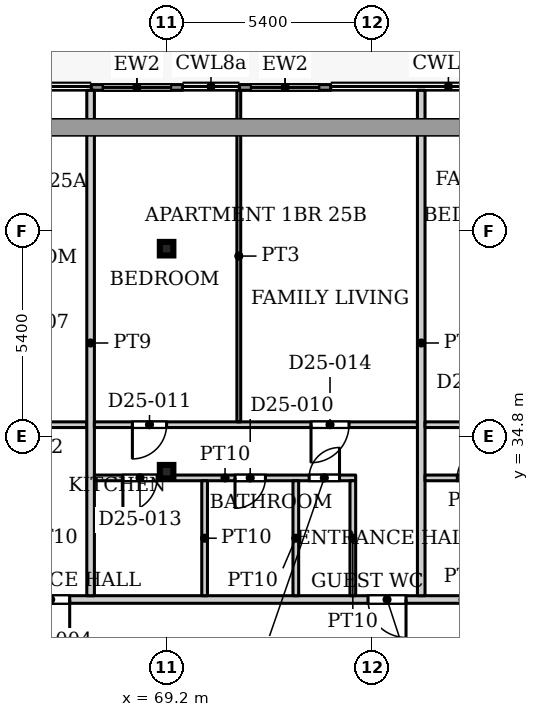
"""IFC4 building model, lengths in metres.
Left out: names, types, materials, properties, quantities, classifications, styles, units other than length and angle.
Written with IfcOpenShell. Run it as: python <this file> out.ifc"""

import sys

from ifc_helpers import new_model, si_unit, direction, frame, frame_2d, origin, origin_2d, place, context, subcontext, project, spatial, rectangle, hollow_rectangle, extrude, source, transform, mapped, element, fill, save


model = new_model("IFC4")
c1 = context("Model", 3, precision=1e-05, world=origin(), true_north=direction((0.0, 1.0)))
c2 = subcontext(c1, "Body", "Model", "MODEL_VIEW")
j1 = project(units=[si_unit("LENGTHUNIT", "METRE"), si_unit("PLANEANGLEUNIT", "RADIAN")], contexts=[c1])
p1 = place(None, origin())
s1 = spatial("IfcSite", under=j1, at=p1, CompositionType="ELEMENT")
p2 = place(p1, origin())
s2 = spatial("IfcBuilding", under=s1, at=p2, CompositionType="ELEMENT")
p3 = place(p2, frame((0.0, 0.0, 109.7)))
s3 = spatial("IfcBuildingStorey", under=s2, at=p3, CompositionType="ELEMENT", Elevation=109.7)
for number, where, z_axis, x_axis in (
    (1, (69.2, 33.863, 0.0), (0.0, 0.0, 1.0), (1.0, 0.0, 0.0)),
    (2, (69.2, 39.732, 0.0), (0.0, 0.0, 1.0), (1.0, 0.0, 0.0)),
):
    element("IfcColumn", number, at=place(p3, frame(where, z_axis=z_axis, x_axis=x_axis)), inside=s3, PredefinedType="COLUMN", context=c2, shape_type="SweptSolid", body=[
        extrude(hollow_rectangle(XDim=0.356, YDim=0.356, WallThickness=0.016, InnerFilletRadius=0.016, OuterFilletRadius=0.032, at=origin_2d()), origin(), (0.0, 0.0, 1.0), 3.9),
    ])
p4 = place(p3, frame((67.218, 43.975, 0.0), z_axis=(0.0, 0.0, 1.0), x_axis=(1.0, 0.0, 0.0)))
e3 = element("IfcWall", 3, at=p4, inside=s3, PredefinedType="SOLIDWALL", context=c2, shape_type="SweptSolid", body=[
    extrude(rectangle(XDim=2.4, YDim=0.15, at=frame_2d((1.2, 0.0))), origin(), (0.0, 0.0, 1.0), 3.75),
])
p5 = place(p4, frame((0.3, 0.0, 0.0)))
e4 = element("IfcOpeningElement", 4, at=p5, cuts=e3, PredefinedType="OPENING", context=c2, shape_type="SweptSolid", body=[
    extrude(rectangle(XDim=1.8, YDim=2.4, at=frame_2d((0.9, 1.2))), frame((0.0, 0.085, 0.0), z_axis=(0.0, -1.0, 0.0), x_axis=(1.0, 0.0, 0.0)), (0.0, 0.0, 1.0), 0.17),
])
p6 = place(p3, frame((71.118, 43.975, 0.0), z_axis=(0.0, 0.0, 1.0), x_axis=(1.0, 0.0, 0.0)))
e5 = element("IfcWall", 5, at=p6, inside=s3, PredefinedType="SOLIDWALL", context=c2, shape_type="SweptSolid", body=[
    extrude(rectangle(XDim=2.4, YDim=0.15, at=frame_2d((1.2, 0.0))), origin(), (0.0, 0.0, 1.0), 3.75),
])
p7 = place(p6, frame((0.3, 0.0, 0.0)))
e6 = element("IfcOpeningElement", 6, at=p7, cuts=e5, PredefinedType="OPENING", context=c2, shape_type="SweptSolid", body=[
    extrude(rectangle(XDim=1.8, YDim=2.4, at=frame_2d((0.9, 1.2))), frame((0.0, 0.085, 0.0), z_axis=(0.0, -1.0, 0.0), x_axis=(1.0, 0.0, 0.0)), (0.0, 0.0, 1.0), 0.17),
])
p8 = place(p3, frame((55.9, 30.5, 0.0), z_axis=(0.0, 0.0, 1.0), x_axis=(1.0, 0.0, 0.0)))
e7 = element("IfcWall", 7, at=p8, inside=s3, PredefinedType="PARTITIONING", context=c2, shape_type="SweptSolid", body=[
    extrude(rectangle(XDim=42.2, YDim=0.2, at=frame_2d((21.1, 0.0))), origin(), (0.0, 0.0, 1.0), 3.6),
])
p9 = place(p8, frame((9.75, 0.0, 0.0)))
e8 = element("IfcOpeningElement", 8, at=p9, cuts=e7, PredefinedType="OPENING", context=c2, shape_type="SweptSolid", body=[
    extrude(rectangle(XDim=1.0, YDim=2.1, at=frame_2d((0.5, 1.05))), frame((0.0, 0.11, 0.0), z_axis=(0.0, -1.0, 0.0), x_axis=(1.0, 0.0, 0.0)), (0.0, 0.0, 1.0), 0.22),
])
p10 = place(p8, frame((18.6, 0.0, 0.0)))
e9 = element("IfcOpeningElement", 9, at=p10, cuts=e7, PredefinedType="OPENING", context=c2, shape_type="SweptSolid", body=[
    extrude(rectangle(XDim=1.0, YDim=2.1, at=frame_2d((0.5, 1.05))), frame((0.0, 0.11, 0.0), z_axis=(0.0, -1.0, 0.0), x_axis=(1.0, 0.0, 0.0)), (0.0, 0.0, 1.0), 0.22),
])
p11 = place(p8, frame((23.4, 0.0, 0.0)))
e10 = element("IfcOpeningElement", 10, at=p11, cuts=e7, PredefinedType="OPENING", context=c2, shape_type="SweptSolid", body=[
    extrude(rectangle(XDim=1.0, YDim=2.1, at=frame_2d((0.5, 1.05))), frame((0.0, 0.11, 0.0), z_axis=(0.0, -1.0, 0.0), x_axis=(1.0, 0.0, 0.0)), (0.0, 0.0, 1.0), 0.22),
])
p12 = place(p8, frame((40.2, 0.0, 0.0)))
e11 = element("IfcOpeningElement", 11, at=p12, cuts=e7, PredefinedType="OPENING", context=c2, shape_type="SweptSolid", body=[
    extrude(rectangle(XDim=1.0, YDim=2.1, at=frame_2d((0.5, 1.05))), frame((0.0, 0.11, 0.0), z_axis=(0.0, -1.0, 0.0), x_axis=(1.0, 0.0, 0.0)), (0.0, 0.0, 1.0), 0.22),
])
p13 = place(p3, frame((55.9, 35.1, 0.0), z_axis=(0.0, 0.0, 1.0), x_axis=(1.0, 0.0, 0.0)))
e12 = element("IfcWall", 12, at=p13, inside=s3, PredefinedType="PARTITIONING", context=c2, shape_type="SweptSolid", body=[
    extrude(rectangle(XDim=11.2, YDim=0.15, at=frame_2d((5.6, 0.0))), origin(), (0.0, 0.0, 1.0), 3.6),
])
p14 = place(p13, frame((9.05, 0.0, 0.0)))
e13 = element("IfcOpeningElement", 13, at=p14, cuts=e12, PredefinedType="OPENING", context=c2, shape_type="SweptSolid", body=[
    extrude(rectangle(XDim=0.9, YDim=2.1, at=frame_2d((0.45, 1.05))), frame((0.0, 0.085, 0.0), z_axis=(0.0, -1.0, 0.0), x_axis=(1.0, 0.0, 0.0)), (0.0, 0.0, 1.0), 0.17),
])
p15 = place(p13, frame((1.5, 0.0, 0.0)))
e14 = element("IfcOpeningElement", 14, at=p15, cuts=e12, PredefinedType="OPENING", context=c2, shape_type="SweptSolid", body=[
    extrude(rectangle(XDim=1.0, YDim=2.1, at=frame_2d((0.5, 1.05))), frame((0.0, 0.085, 0.0), z_axis=(0.0, -1.0, 0.0), x_axis=(1.0, 0.0, 0.0)), (0.0, 0.0, 1.0), 0.17),
])
p16 = place(p13, frame((6.5, 0.0, 0.0)))
e15 = element("IfcOpeningElement", 15, at=p16, cuts=e12, PredefinedType="OPENING", context=c2, shape_type="SweptSolid", body=[
    extrude(rectangle(XDim=0.9, YDim=2.1, at=frame_2d((0.45, 1.05))), frame((0.0, 0.085, 0.0), z_axis=(0.0, -1.0, 0.0), x_axis=(1.0, 0.0, 0.0)), (0.0, 0.0, 1.0), 0.17),
])
p17 = place(p3, frame((67.2, 30.6, 0.0), z_axis=(0.0, 0.0, 1.0), x_axis=(0.0, 1.0, 0.0)))
e16 = element("IfcWall", 16, at=p17, inside=s3, PredefinedType="PARTITIONING", context=c2, shape_type="SweptSolid", body=[
    extrude(rectangle(XDim=13.3, YDim=0.2, at=frame_2d((6.65, 0.0))), origin(), (0.0, 0.0, 1.0), 3.6),
])
p18 = place(p3, frame((67.3, 33.7, 0.0), z_axis=(0.0, 0.0, 1.0), x_axis=(1.0, 0.0, 0.0)))
e17 = element("IfcWall", 17, at=p18, inside=s3, PredefinedType="PARTITIONING", context=c2, shape_type="SweptSolid", body=[
    extrude(rectangle(XDim=6.875, YDim=0.15, at=frame_2d((3.438, 0.0))), origin(), (0.0, 0.0, 1.0), 3.6),
])
p19 = place(p18, frame((3.7, 0.0, 0.0)))
e18 = element("IfcOpeningElement", 18, at=p19, cuts=e17, PredefinedType="OPENING", context=c2, shape_type="SweptSolid", body=[
    extrude(rectangle(XDim=0.8, YDim=2.1, at=frame_2d((0.4, 1.05))), frame((0.0, 0.085, 0.0), z_axis=(0.0, -1.0, 0.0), x_axis=(1.0, 0.0, 0.0)), (0.0, 0.0, 1.0), 0.17),
])
p20 = place(p18, frame((0.75, 0.0, 0.0)))
e19 = element("IfcOpeningElement", 19, at=p20, cuts=e17, PredefinedType="OPENING", context=c2, shape_type="SweptSolid", body=[
    extrude(rectangle(XDim=0.9, YDim=2.1, at=frame_2d((0.45, 1.05))), frame((0.0, 0.085, 0.0), z_axis=(0.0, -1.0, 0.0), x_axis=(1.0, 0.0, 0.0)), (0.0, 0.0, 1.0), 0.17),
])
p21 = place(p18, frame((5.65, 0.0, 0.0)))
e20 = element("IfcOpeningElement", 20, at=p21, cuts=e17, PredefinedType="OPENING", context=c2, shape_type="SweptSolid", body=[
    extrude(rectangle(XDim=0.8, YDim=2.1, at=frame_2d((0.4, 1.05))), frame((0.0, 0.085, 0.0), z_axis=(0.0, -1.0, 0.0), x_axis=(1.0, 0.0, 0.0)), (0.0, 0.0, 1.0), 0.17),
])
p22 = place(p3, frame((67.3, 35.1, 0.0), z_axis=(0.0, 0.0, 1.0), x_axis=(1.0, 0.0, 0.0)))
e21 = element("IfcWall", 21, at=p22, inside=s3, PredefinedType="PARTITIONING", context=c2, shape_type="SweptSolid", body=[
    extrude(rectangle(XDim=8.5, YDim=0.15, at=frame_2d((4.25, 0.0))), origin(), (0.0, 0.0, 1.0), 3.6),
])
p23 = place(p22, frame((1.0, 0.0, 0.0)))
e22 = element("IfcOpeningElement", 22, at=p23, cuts=e21, PredefinedType="OPENING", context=c2, shape_type="SweptSolid", body=[
    extrude(rectangle(XDim=0.9, YDim=2.1, at=frame_2d((0.45, 1.05))), frame((0.0, 0.085, 0.0), z_axis=(0.0, -1.0, 0.0), x_axis=(1.0, 0.0, 0.0)), (0.0, 0.0, 1.0), 0.17),
])
p24 = place(p22, frame((5.7, 0.0, 0.0)))
e23 = element("IfcOpeningElement", 23, at=p24, cuts=e21, PredefinedType="OPENING", context=c2, shape_type="SweptSolid", body=[
    extrude(rectangle(XDim=1.0, YDim=2.1, at=frame_2d((0.5, 1.05))), frame((0.0, 0.085, 0.0), z_axis=(0.0, -1.0, 0.0), x_axis=(1.0, 0.0, 0.0)), (0.0, 0.0, 1.0), 0.17),
])
p25 = place(p3, frame((70.2, 30.6, 0.0), z_axis=(0.0, 0.0, 1.0), x_axis=(0.0, 1.0, 0.0)))
e24 = element("IfcWall", 24, at=p25, inside=s3, PredefinedType="PARTITIONING", context=c2, shape_type="SweptSolid", body=[
    extrude(rectangle(XDim=3.025, YDim=0.15, at=frame_2d((1.512, 0.0))), origin(), (0.0, 0.0, 1.0), 3.6),
])
p26 = place(p3, frame((71.1, 35.175, 0.0), z_axis=(0.0, 0.0, 1.0), x_axis=(0.0, 1.0, 0.0)))
e25 = element("IfcWall", 25, at=p26, inside=s3, PredefinedType="PARTITIONING", context=c2, shape_type="SweptSolid", body=[
    extrude(rectangle(XDim=8.725, YDim=0.1, at=frame_2d((4.362, 0.0))), origin(), (0.0, 0.0, 1.0), 3.6),
])
for number, where, z_axis, x_axis in (
    (26, (72.6, 30.6, 0.0), (0.0, 0.0, 1.0), (0.0, 1.0, 0.0)),
    (27, (74.1, 30.6, 0.0), (0.0, 0.0, 1.0), (0.0, 1.0, 0.0)),
):
    element("IfcWall", number, at=place(p3, frame(where, z_axis=z_axis, x_axis=x_axis)), inside=s3, PredefinedType="PARTITIONING", context=c2, shape_type="SweptSolid", body=[
        extrude(rectangle(XDim=3.025, YDim=0.15, at=frame_2d((1.512, 0.0))), origin(), (0.0, 0.0, 1.0), 3.6),
    ])
p27 = place(p3, frame((75.9, 30.6, 0.0), z_axis=(0.0, 0.0, 1.0), x_axis=(0.0, 1.0, 0.0)))
e28 = element("IfcWall", 28, at=p27, inside=s3, PredefinedType="PARTITIONING", context=c2, shape_type="SweptSolid", body=[
    extrude(rectangle(XDim=13.3, YDim=0.2, at=frame_2d((6.65, 0.0))), origin(), (0.0, 0.0, 1.0), 3.6),
])
p28 = place(p3, frame((76.0, 33.7, 0.0), z_axis=(0.0, 0.0, 1.0), x_axis=(1.0, 0.0, 0.0)))
e29 = element("IfcWall", 29, at=p28, inside=s3, PredefinedType="PARTITIONING", context=c2, shape_type="SweptSolid", body=[
    extrude(rectangle(XDim=2.525, YDim=0.15, at=frame_2d((1.262, 0.0))), origin(), (0.0, 0.0, 1.0), 3.6),
])
p29 = place(p28, frame((0.85, 0.0, 0.0)))
e30 = element("IfcOpeningElement", 30, at=p29, cuts=e29, PredefinedType="OPENING", context=c2, shape_type="SweptSolid", body=[
    extrude(rectangle(XDim=0.8, YDim=2.1, at=frame_2d((0.4, 1.05))), frame((0.0, 0.085, 0.0), z_axis=(0.0, -1.0, 0.0), x_axis=(1.0, 0.0, 0.0)), (0.0, 0.0, 1.0), 0.17),
])
p30 = place(p3, frame((76.0, 35.1, 0.0), z_axis=(0.0, 0.0, 1.0), x_axis=(1.0, 0.0, 0.0)))
e31 = element("IfcWall", 31, at=p30, inside=s3, PredefinedType="PARTITIONING", context=c2, shape_type="SweptSolid", body=[
    extrude(rectangle(XDim=14.5, YDim=0.15, at=frame_2d((7.25, 0.0))), origin(), (0.0, 0.0, 1.0), 3.6),
])
p31 = place(p30, frame((0.95, 0.0, 0.0)))
e32 = element("IfcOpeningElement", 32, at=p31, cuts=e31, PredefinedType="OPENING", context=c2, shape_type="SweptSolid", body=[
    extrude(rectangle(XDim=0.9, YDim=2.1, at=frame_2d((0.45, 1.05))), frame((0.0, 0.085, 0.0), z_axis=(0.0, -1.0, 0.0), x_axis=(1.0, 0.0, 0.0)), (0.0, 0.0, 1.0), 0.17),
])
p32 = place(p30, frame((6.65, 0.0, 0.0)))
e33 = element("IfcOpeningElement", 33, at=p32, cuts=e31, PredefinedType="OPENING", context=c2, shape_type="SweptSolid", body=[
    extrude(rectangle(XDim=0.9, YDim=2.1, at=frame_2d((0.45, 1.05))), frame((0.0, 0.085, 0.0), z_axis=(0.0, -1.0, 0.0), x_axis=(1.0, 0.0, 0.0)), (0.0, 0.0, 1.0), 0.17),
])
p33 = place(p30, frame((3.9, 0.0, 0.0)))
e34 = element("IfcOpeningElement", 34, at=p33, cuts=e31, PredefinedType="OPENING", context=c2, shape_type="SweptSolid", body=[
    extrude(rectangle(XDim=1.0, YDim=2.1, at=frame_2d((0.5, 1.05))), frame((0.0, 0.085, 0.0), z_axis=(0.0, -1.0, 0.0), x_axis=(1.0, 0.0, 0.0)), (0.0, 0.0, 1.0), 0.17),
])
p34 = place(p30, frame((9.45, 0.0, 0.0)))
e35 = element("IfcOpeningElement", 35, at=p34, cuts=e31, PredefinedType="OPENING", context=c2, shape_type="SweptSolid", body=[
    extrude(rectangle(XDim=0.9, YDim=2.1, at=frame_2d((0.45, 1.05))), frame((0.0, 0.085, 0.0), z_axis=(0.0, -1.0, 0.0), x_axis=(1.0, 0.0, 0.0)), (0.0, 0.0, 1.0), 0.17),
])
p35 = place(p30, frame((13.25, 0.0, 0.0)))
e36 = element("IfcOpeningElement", 36, at=p35, cuts=e31, PredefinedType="OPENING", context=c2, shape_type="SweptSolid", body=[
    extrude(rectangle(XDim=0.9, YDim=2.1, at=frame_2d((0.45, 1.05))), frame((0.0, 0.085, 0.0), z_axis=(0.0, -1.0, 0.0), x_axis=(1.0, 0.0, 0.0)), (0.0, 0.0, 1.0), 0.17),
])
m1 = source(origin(), c2, "Body", "SweptSolid", [
    extrude(rectangle(XDim=1.8, YDim=2.4, at=frame_2d((0.9, 1.2))), frame((0.0, 0.025, 0.0), z_axis=(0.0, -1.0, 0.0), x_axis=(1.0, 0.0, 0.0)), (0.0, 0.0, 1.0), 0.05),
])
p36 = place(p5, origin())
e37 = element("IfcDoor", 37, at=p36, inside=s3, OperationType="SLIDING_TO_LEFT", PredefinedType="DOOR", context=c2, shape_type="MappedRepresentation", body=[
    mapped(m1, transform((0.0, 0.0, 0.0), x_axis=(1.0, 0.0, 0.0), y_axis=(0.0, 1.0, 0.0), z_axis=(0.0, 0.0, 1.0), scale=1.0)),
])
fill(e4, e37)
p37 = place(p7, origin())
e38 = element("IfcDoor", 38, at=p37, inside=s3, OperationType="SLIDING_TO_LEFT", PredefinedType="DOOR", context=c2, shape_type="MappedRepresentation", body=[
    mapped(m1, transform((0.0, 0.0, 0.0), x_axis=(1.0, 0.0, 0.0), y_axis=(0.0, 1.0, 0.0), z_axis=(0.0, 0.0, 1.0), scale=1.0)),
])
fill(e6, e38)
m2 = source(origin(), c2, "Body", "SweptSolid", [
    extrude(rectangle(XDim=1.0, YDim=2.1, at=frame_2d((0.5, 1.05))), frame((0.0, 0.025, 0.0), z_axis=(0.0, -1.0, 0.0), x_axis=(1.0, 0.0, 0.0)), (0.0, 0.0, 1.0), 0.05),
])
p38 = place(p9, origin())
e39 = element("IfcDoor", 39, at=p38, inside=s3, OperationType="SINGLE_SWING_RIGHT", PredefinedType="DOOR", context=c2, shape_type="MappedRepresentation", body=[
    mapped(m2, transform((0.0, 0.0, 0.0), x_axis=(1.0, 0.0, 0.0), y_axis=(0.0, 1.0, 0.0), z_axis=(0.0, 0.0, 1.0), scale=1.0)),
])
fill(e8, e39)
m3 = source(origin(), c2, "Body", "SweptSolid", [
    extrude(rectangle(XDim=0.8, YDim=2.1, at=frame_2d((0.4, 1.05))), frame((0.0, 0.025, 0.0), z_axis=(0.0, -1.0, 0.0), x_axis=(1.0, 0.0, 0.0)), (0.0, 0.0, 1.0), 0.05),
])
p39 = place(p19, origin())
e40 = element("IfcDoor", 40, at=p39, inside=s3, OperationType="SINGLE_SWING_RIGHT", PredefinedType="DOOR", context=c2, shape_type="MappedRepresentation", body=[
    mapped(m3, transform((0.0, 0.0, 0.0), x_axis=(1.0, 0.0, 0.0), y_axis=(0.0, 1.0, 0.0), z_axis=(0.0, 0.0, 1.0), scale=1.0)),
])
fill(e18, e40)
m4 = source(origin(), c2, "Body", "SweptSolid", [
    extrude(rectangle(XDim=0.9, YDim=2.1, at=frame_2d((0.45, 1.05))), frame((0.0, 0.025, 0.0), z_axis=(0.0, -1.0, 0.0), x_axis=(1.0, 0.0, 0.0)), (0.0, 0.0, 1.0), 0.05),
])
p40 = place(p23, origin())
e41 = element("IfcDoor", 41, at=p40, inside=s3, OperationType="SINGLE_SWING_RIGHT", PredefinedType="DOOR", context=c2, shape_type="MappedRepresentation", body=[
    mapped(m4, transform((0.0, 0.0, 0.0), x_axis=(1.0, 0.0, 0.0), y_axis=(0.0, 1.0, 0.0), z_axis=(0.0, 0.0, 1.0), scale=1.0)),
])
fill(e22, e41)
p41 = place(p10, origin())
e42 = element("IfcDoor", 42, at=p41, inside=s3, OperationType="SINGLE_SWING_RIGHT", PredefinedType="DOOR", context=c2, shape_type="MappedRepresentation", body=[
    mapped(m2, transform((0.0, 0.0, 0.0), x_axis=(1.0, 0.0, 0.0), y_axis=(0.0, 1.0, 0.0), z_axis=(0.0, 0.0, 1.0), scale=1.0)),
])
fill(e9, e42)
p42 = place(p20, origin())
e43 = element("IfcDoor", 43, at=p42, inside=s3, OperationType="SINGLE_SWING_RIGHT", PredefinedType="DOOR", context=c2, shape_type="MappedRepresentation", body=[
    mapped(m4, transform((0.0, 0.0, 0.0), x_axis=(1.0, 0.0, 0.0), y_axis=(0.0, 1.0, 0.0), z_axis=(0.0, 0.0, 1.0), scale=1.0)),
])
fill(e19, e43)
m5 = source(origin(), c2, "Body", "SweptSolid", [
    extrude(rectangle(XDim=1.0, YDim=2.1, at=frame_2d((0.5, 1.05))), frame((0.0, 0.025, 0.0), z_axis=(0.0, -1.0, 0.0), x_axis=(1.0, 0.0, 0.0)), (0.0, 0.0, 1.0), 0.05),
])
p43 = place(p24, origin())
e44 = element("IfcDoor", 44, at=p43, inside=s3, OperationType="SINGLE_SWING_RIGHT", PredefinedType="DOOR", context=c2, shape_type="MappedRepresentation", body=[
    mapped(m5, transform((0.0, 0.0, 0.0), x_axis=(1.0, 0.0, 0.0), y_axis=(0.0, 1.0, 0.0), z_axis=(0.0, 0.0, 1.0), scale=1.0)),
])
fill(e23, e44)
p44 = place(p21, origin())
e45 = element("IfcDoor", 45, at=p44, inside=s3, OperationType="SINGLE_SWING_LEFT", PredefinedType="DOOR", context=c2, shape_type="MappedRepresentation", body=[
    mapped(m3, transform((0.0, 0.0, 0.0), x_axis=(1.0, 0.0, 0.0), y_axis=(0.0, 1.0, 0.0), z_axis=(0.0, 0.0, 1.0), scale=1.0)),
])
fill(e20, e45)
p45 = place(p29, origin())
e46 = element("IfcDoor", 46, at=p45, inside=s3, OperationType="SINGLE_SWING_LEFT", PredefinedType="DOOR", context=c2, shape_type="MappedRepresentation", body=[
    mapped(m3, transform((0.0, 0.0, 0.0), x_axis=(1.0, 0.0, 0.0), y_axis=(0.0, 1.0, 0.0), z_axis=(0.0, 0.0, 1.0), scale=1.0)),
])
fill(e30, e46)
save(model, sys.argv[1])
